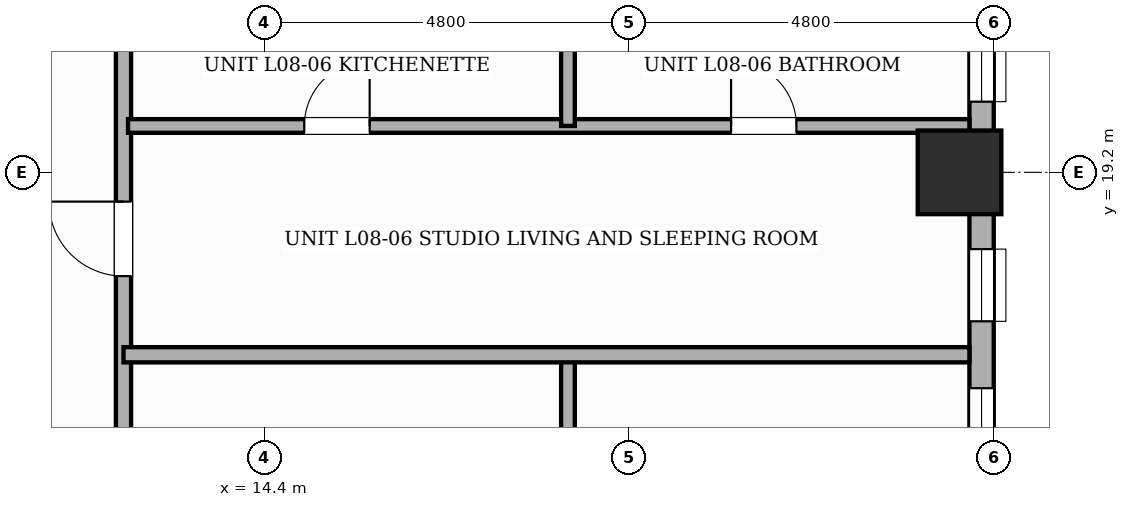
"""IFC4 building model, lengths in metres.
Left out: names, types, materials, properties, quantities, classifications, styles, units other than length and angle.
Written with IfcOpenShell. Run it as: python <this file> out.ifc"""

import sys

from ifc_helpers import new_model, si_unit, direction, frame, frame_2d, origin, origin_2d, place, context, subcontext, project, spatial, rectangle, extrude, element, fill, save


model = new_model("IFC4")
c1 = context("Model", 3, precision=1e-05, world=origin(), true_north=direction((0.0, 1.0)))
c2 = subcontext(c1, "Body", "Model", "MODEL_VIEW")
j1 = project(units=[si_unit("LENGTHUNIT", "METRE"), si_unit("PLANEANGLEUNIT", "RADIAN")], contexts=[c1])
p1 = place(None, origin())
s1 = spatial("IfcSite", under=j1, at=p1, CompositionType="ELEMENT")
p2 = place(p1, origin())
s2 = spatial("IfcBuilding", under=s1, at=p2, CompositionType="ELEMENT")
p3 = place(p2, frame((0.0, 0.0, 35.8)))
s3 = spatial("IfcBuildingStorey", under=s2, at=p3, CompositionType="ELEMENT", Elevation=35.8)
p4 = place(p3, frame((23.55, 19.2, 0.0), z_axis=(0.0, 0.0, 1.0), x_axis=(1.0, 0.0, 0.0)))
e1 = element("IfcColumn", 1, at=p4, inside=s3, PredefinedType="COLUMN", context=c2, shape_type="SweptSolid", body=[
    extrude(rectangle(XDim=1.1, YDim=1.1, at=origin_2d()), origin(), (0.0, 0.0, 1.0), 3.6),
])
p5 = place(p3, frame((23.84, 26.4, 0.0), z_axis=(0.0, 0.0, 1.0), x_axis=(0.0, -1.0, 0.0)))
e2 = element("IfcWall", 2, at=p5, inside=s3, PredefinedType="STANDARD", context=c2, shape_type="SweptSolid", body=[
    extrude(rectangle(XDim=19.2, YDim=0.32, at=frame_2d((9.6, 0.0))), origin(), (0.0, 0.0, 1.0), 2.53),
])
p6 = place(p5, frame((15.415, 0.0, 0.45)))
e3 = element("IfcOpeningElement", 3, at=p6, cuts=e2, PredefinedType="OPENING", context=c2, shape_type="SweptSolid", body=[
    extrude(rectangle(XDim=0.6, YDim=1.8, at=frame_2d((0.3, 0.9))), frame((0.0, 0.17, 0.0), z_axis=(0.0, -1.0, 0.0), x_axis=(1.0, 0.0, 0.0)), (0.0, 0.0, 1.0), 0.34),
])
p7 = place(p5, frame((13.43, 0.0, 0.65)))
e4 = element("IfcOpeningElement", 4, at=p7, cuts=e2, PredefinedType="OPENING", context=c2, shape_type="SweptSolid", body=[
    extrude(rectangle(XDim=1.4, YDim=1.1, at=frame_2d((0.7, 0.55))), frame((0.0, 0.17, 0.0), z_axis=(0.0, -1.0, 0.0), x_axis=(1.0, 0.0, 0.0)), (0.0, 0.0, 1.0), 0.34),
])
p8 = place(p5, frame((8.21, 0.0, 0.45)))
e5 = element("IfcOpeningElement", 5, at=p8, cuts=e2, PredefinedType="OPENING", context=c2, shape_type="SweptSolid", body=[
    extrude(rectangle(XDim=0.95, YDim=1.8, at=frame_2d((0.475, 0.9))), frame((0.0, 0.17, 0.0), z_axis=(0.0, -1.0, 0.0), x_axis=(1.0, 0.0, 0.0)), (0.0, 0.0, 1.0), 0.34),
])
p9 = place(p5, frame((3.285, 0.0, 0.65)))
e6 = element("IfcOpeningElement", 6, at=p9, cuts=e2, PredefinedType="OPENING", context=c2, shape_type="SweptSolid", body=[
    extrude(rectangle(XDim=1.4, YDim=1.1, at=frame_2d((0.7, 0.55))), frame((0.0, 0.17, 0.0), z_axis=(0.0, -1.0, 0.0), x_axis=(1.0, 0.0, 0.0)), (0.0, 0.0, 1.0), 0.34),
])
p10 = place(p5, frame((10.04, 0.0, 0.45)))
e7 = element("IfcOpeningElement", 7, at=p10, cuts=e2, PredefinedType="OPENING", context=c2, shape_type="SweptSolid", body=[
    extrude(rectangle(XDim=0.95, YDim=1.8, at=frame_2d((0.475, 0.9))), frame((0.0, 0.17, 0.0), z_axis=(0.0, -1.0, 0.0), x_axis=(1.0, 0.0, 0.0)), (0.0, 0.0, 1.0), 0.34),
])
p11 = place(p5, frame((5.32, 0.0, 0.45)))
e8 = element("IfcOpeningElement", 8, at=p11, cuts=e2, PredefinedType="OPENING", context=c2, shape_type="SweptSolid", body=[
    extrude(rectangle(XDim=0.95, YDim=1.8, at=frame_2d((0.475, 0.9))), frame((0.0, 0.17, 0.0), z_axis=(0.0, -1.0, 0.0), x_axis=(1.0, 0.0, 0.0)), (0.0, 0.0, 1.0), 0.34),
])
p12 = place(p5, frame((0.88, 0.0, 0.45)))
e9 = element("IfcOpeningElement", 9, at=p12, cuts=e2, PredefinedType="OPENING", context=c2, shape_type="SweptSolid", body=[
    extrude(rectangle(XDim=0.75, YDim=1.8, at=frame_2d((0.375, 0.9))), frame((0.0, 0.17, 0.0), z_axis=(0.0, -1.0, 0.0), x_axis=(1.0, 0.0, 0.0)), (0.0, 0.0, 1.0), 0.34),
])
p13 = place(p3, frame((12.55, 5.12, 0.0), z_axis=(0.0, 0.0, 1.0), x_axis=(0.0, 1.0, 0.0)))
e10 = element("IfcWall", 10, at=p13, inside=s3, PredefinedType="PARTITIONING", context=c2, shape_type="SweptSolid", body=[
    extrude(rectangle(XDim=20.63, YDim=0.2, at=frame_2d((10.315, 0.0))), origin(), (0.0, 0.0, 1.0), 3.35),
])
p14 = place(p13, frame((1.004, 0.0, 0.0)))
e11 = element("IfcOpeningElement", 11, at=p14, cuts=e10, PredefinedType="OPENING", context=c2, shape_type="SweptSolid", body=[
    extrude(rectangle(XDim=0.98, YDim=2.18, at=frame_2d((0.49, 1.09))), frame((0.0, 0.11, 0.0), z_axis=(0.0, -1.0, 0.0), x_axis=(1.0, 0.0, 0.0)), (0.0, 0.0, 1.0), 0.22),
])
p15 = place(p13, frame((6.68, 0.0, 0.0)))
e12 = element("IfcOpeningElement", 12, at=p15, cuts=e10, PredefinedType="OPENING", context=c2, shape_type="SweptSolid", body=[
    extrude(rectangle(XDim=0.98, YDim=2.18, at=frame_2d((0.49, 1.09))), frame((0.0, 0.11, 0.0), z_axis=(0.0, -1.0, 0.0), x_axis=(1.0, 0.0, 0.0)), (0.0, 0.0, 1.0), 0.22),
])
p16 = place(p13, frame((12.715, 0.0, 0.0)))
e13 = element("IfcOpeningElement", 13, at=p16, cuts=e10, PredefinedType="OPENING", context=c2, shape_type="SweptSolid", body=[
    extrude(rectangle(XDim=0.98, YDim=2.18, at=frame_2d((0.49, 1.09))), frame((0.0, 0.11, 0.0), z_axis=(0.0, -1.0, 0.0), x_axis=(1.0, 0.0, 0.0)), (0.0, 0.0, 1.0), 0.22),
])
p17 = place(p13, frame((16.88, 0.0, 0.0)))
e14 = element("IfcOpeningElement", 14, at=p17, cuts=e10, PredefinedType="OPENING", context=c2, shape_type="SweptSolid", body=[
    extrude(rectangle(XDim=0.98, YDim=2.18, at=frame_2d((0.49, 1.09))), frame((0.0, 0.11, 0.0), z_axis=(0.0, -1.0, 0.0), x_axis=(1.0, 0.0, 0.0)), (0.0, 0.0, 1.0), 0.22),
])
p18 = place(p3, frame((18.398, 13.34, 0.0), z_axis=(0.0, 0.0, 1.0), x_axis=(0.0, 1.0, 0.0)))
e15 = element("IfcWall", 15, at=p18, inside=s3, PredefinedType="PLUMBINGWALL", context=c2, shape_type="SweptSolid", body=[
    extrude(rectangle(XDim=3.5, YDim=0.18, at=frame_2d((1.75, 0.0))), origin(), (0.0, 0.0, 1.0), 3.35),
])
p19 = place(p3, frame((12.55, 16.8, 0.0), z_axis=(0.0, 0.0, 1.0), x_axis=(1.0, 0.0, 0.0)))
e16 = element("IfcWall", 16, at=p19, inside=s3, PredefinedType="SOLIDWALL", context=c2, shape_type="SweptSolid", body=[
    extrude(rectangle(XDim=11.13, YDim=0.2, at=frame_2d((5.565, 0.0))), origin(), (0.0, 0.0, 1.0), 3.35),
])
p20 = place(p3, frame((12.61, 19.81, 0.0), z_axis=(0.0, 0.0, 1.0), x_axis=(1.0, 0.0, 0.0)))
e17 = element("IfcWall", 17, at=p20, inside=s3, PredefinedType="PLUMBINGWALL", context=c2, shape_type="SweptSolid", body=[
    extrude(rectangle(XDim=11.07, YDim=0.18, at=frame_2d((5.535, 0.0))), origin(), (0.0, 0.0, 1.0), 3.35),
])
p21 = place(p20, frame((2.319, 0.0, 0.0)))
e18 = element("IfcOpeningElement", 18, at=p21, cuts=e17, PredefinedType="OPENING", context=c2, shape_type="SweptSolid", body=[
    extrude(rectangle(XDim=0.86, YDim=2.1, at=frame_2d((0.43, 1.05))), frame((0.0, 0.1, 0.0), z_axis=(0.0, -1.0, 0.0), x_axis=(1.0, 0.0, 0.0)), (0.0, 0.0, 1.0), 0.2),
])
p22 = place(p20, frame((7.934, 0.0, 0.0)))
e19 = element("IfcOpeningElement", 19, at=p22, cuts=e17, PredefinedType="OPENING", context=c2, shape_type="SweptSolid", body=[
    extrude(rectangle(XDim=0.86, YDim=2.1, at=frame_2d((0.43, 1.05))), frame((0.0, 0.1, 0.0), z_axis=(0.0, -1.0, 0.0), x_axis=(1.0, 0.0, 0.0)), (0.0, 0.0, 1.0), 0.2),
])
p23 = place(p3, frame((18.398, 19.81, 0.0), z_axis=(0.0, 0.0, 1.0), x_axis=(0.0, 1.0, 0.0)))
e20 = element("IfcWall", 20, at=p23, inside=s3, PredefinedType="PLUMBINGWALL", context=c2, shape_type="SweptSolid", body=[
    extrude(rectangle(XDim=1.63, YDim=0.18, at=frame_2d((0.815, 0.0))), origin(), (0.0, 0.0, 1.0), 3.35),
])
p24 = place(p8, origin())
e21 = element("IfcWindow", 21, at=p24, inside=s3, PartitioningType="SINGLE_PANEL", PredefinedType="WINDOW", context=c2, shape_type="SweptSolid", body=[
    extrude(rectangle(XDim=0.95, YDim=1.8, at=frame_2d((0.475, 0.9))), frame((0.0, 0.03, 0.0), z_axis=(0.0, -1.0, 0.0), x_axis=(1.0, 0.0, 0.0)), (0.0, 0.0, 1.0), 0.06),
])
fill(e5, e21)
p25 = place(p10, origin())
e22 = element("IfcWindow", 22, at=p25, inside=s3, PartitioningType="SINGLE_PANEL", PredefinedType="WINDOW", context=c2, shape_type="SweptSolid", body=[
    extrude(rectangle(XDim=0.95, YDim=1.8, at=frame_2d((0.475, 0.9))), frame((0.0, 0.03, 0.0), z_axis=(0.0, -1.0, 0.0), x_axis=(1.0, 0.0, 0.0)), (0.0, 0.0, 1.0), 0.06),
])
fill(e7, e22)
p26 = place(p11, origin())
e23 = element("IfcWindow", 23, at=p26, inside=s3, PartitioningType="SINGLE_PANEL", PredefinedType="WINDOW", context=c2, shape_type="SweptSolid", body=[
    extrude(rectangle(XDim=0.95, YDim=1.8, at=frame_2d((0.475, 0.9))), frame((0.0, 0.03, 0.0), z_axis=(0.0, -1.0, 0.0), x_axis=(1.0, 0.0, 0.0)), (0.0, 0.0, 1.0), 0.06),
])
fill(e8, e23)
p27 = place(p16, origin())
e24 = element("IfcDoor", 24, at=p27, inside=s3, OperationType="SINGLE_SWING_RIGHT", PredefinedType="DOOR", context=c2, shape_type="SweptSolid", body=[
    extrude(rectangle(XDim=0.98, YDim=2.18, at=frame_2d((0.49, 1.09))), frame((0.0, 0.025, 0.0), z_axis=(0.0, -1.0, 0.0), x_axis=(1.0, 0.0, 0.0)), (0.0, 0.0, 1.0), 0.05),
])
fill(e13, e24)
p28 = place(p21, origin())
e25 = element("IfcDoor", 25, at=p28, inside=s3, OperationType="SINGLE_SWING_RIGHT", PredefinedType="DOOR", context=c2, shape_type="SweptSolid", body=[
    extrude(rectangle(XDim=0.86, YDim=2.1, at=frame_2d((0.43, 1.05))), frame((0.0, 0.025, 0.0), z_axis=(0.0, -1.0, 0.0), x_axis=(1.0, 0.0, 0.0)), (0.0, 0.0, 1.0), 0.05),
])
fill(e18, e25)
p29 = place(p22, origin())
e26 = element("IfcDoor", 26, at=p29, inside=s3, OperationType="SINGLE_SWING_LEFT", PredefinedType="DOOR", context=c2, shape_type="SweptSolid", body=[
    extrude(rectangle(XDim=0.86, YDim=2.1, at=frame_2d((0.43, 1.05))), frame((0.0, 0.025, 0.0), z_axis=(0.0, -1.0, 0.0), x_axis=(1.0, 0.0, 0.0)), (0.0, 0.0, 1.0), 0.05),
])
fill(e19, e26)
save(model, sys.argv[1])
